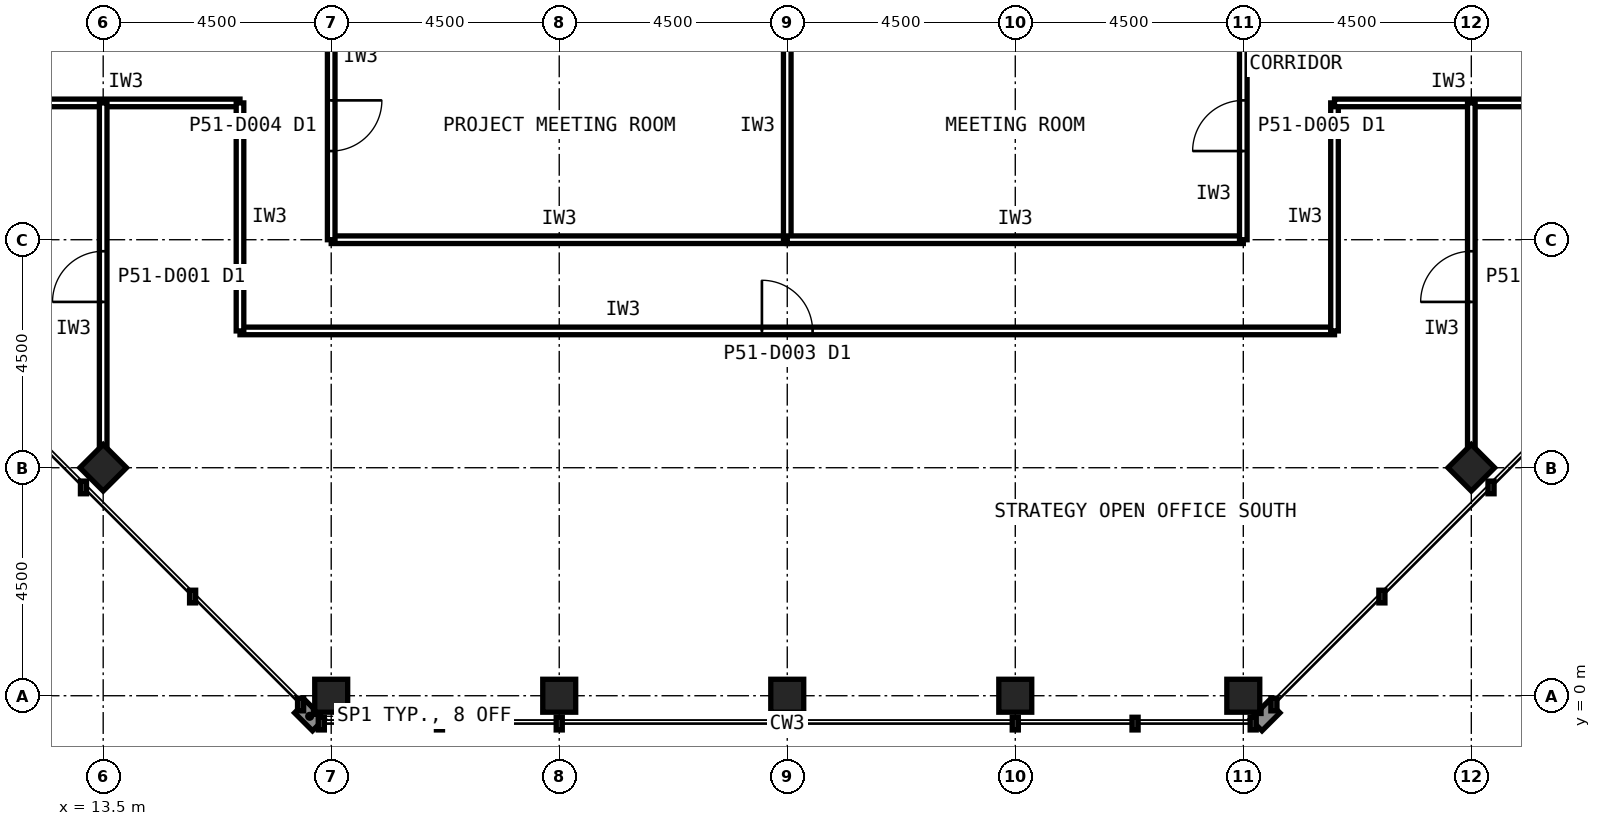
"""IFC4 building model, lengths in metres.
Left out: names, types, materials, properties, quantities, classifications, styles, units other than length and angle.
Written with IfcOpenShell. Run it as: python <this file> out.ifc"""

import sys

from ifc_helpers import new_model, si_unit, direction, frame, frame_2d, origin, origin_2d, place, context, subcontext, project, spatial, rectangle, hollow_rectangle, extrude, element, fill, save


model = new_model("IFC4")
c1 = context("Model", 3, precision=1e-05, world=origin(), true_north=direction((0.0, 1.0)))
c2 = subcontext(c1, "Body", "Model", "MODEL_VIEW")
j1 = project(units=[si_unit("LENGTHUNIT", "METRE"), si_unit("PLANEANGLEUNIT", "RADIAN")], contexts=[c1])
p1 = place(None, origin())
s1 = spatial("IfcSite", under=j1, at=p1, CompositionType="ELEMENT")
p2 = place(p1, origin())
s2 = spatial("IfcBuilding", under=s1, at=p2, CompositionType="ELEMENT")
p3 = place(p2, frame((0.0, 0.0, 214.6)))
s3 = spatial("IfcBuildingStorey", under=s2, at=p3, CompositionType="ELEMENT", Elevation=214.6)
for number, where, z_axis, x_axis in (
    (1, (18.0, 0.0, 0.0), (0.0, 0.0, 1.0), (1.0, 0.0, 0.0)),
    (2, (22.5, 0.0, 0.0), (0.0, 0.0, 1.0), (1.0, 0.0, 0.0)),
    (3, (27.0, 0.0, 0.0), (0.0, 0.0, 1.0), (1.0, 0.0, 0.0)),
    (4, (31.5, 0.0, 0.0), (0.0, 0.0, 1.0), (1.0, 0.0, 0.0)),
    (5, (36.0, 0.0, 0.0), (0.0, 0.0, 1.0), (1.0, 0.0, 0.0)),
    (6, (13.5, 4.5, 0.0), (0.0, 0.0, 1.0), (0.707, 0.707, 0.0)),
    (7, (40.5, 4.5, 0.0), (0.0, 0.0, 1.0), (0.707, 0.707, 0.0)),
):
    element("IfcColumn", number, at=place(p3, frame(where, z_axis=z_axis, x_axis=x_axis)), inside=s3, PredefinedType="COLUMN", context=c2, shape_type="SweptSolid", body=[
        extrude(hollow_rectangle(XDim=0.65, YDim=0.65, WallThickness=0.032, at=origin_2d()), origin(), (0.0, 0.0, 1.0), 4.0),
    ])
p4 = place(p3, frame((16.2, 7.2, 0.0), z_axis=(0.0, 0.0, 1.0), x_axis=(1.0, 0.0, 0.0)))
e8 = element("IfcWall", 8, at=p4, inside=s3, PredefinedType="PARTITIONING", context=c2, shape_type="SweptSolid", body=[
    extrude(rectangle(XDim=21.6, YDim=0.15, at=frame_2d((10.8, 0.0))), origin(), (0.0, 0.0, 1.0), 3.84),
])
p5 = place(p4, frame((10.3, 0.0, 0.0)))
e9 = element("IfcOpeningElement", 9, at=p5, cuts=e8, PredefinedType="OPENING", context=c2, shape_type="SweptSolid", body=[
    extrude(rectangle(XDim=1.0, YDim=2.1, at=frame_2d((0.5, 1.05))), frame((0.0, 0.085, 0.0), z_axis=(0.0, -1.0, 0.0), x_axis=(1.0, 0.0, 0.0)), (0.0, 0.0, 1.0), 0.17),
])
for number, where, z_axis, x_axis in (
    (10, (11.7, 11.7, 0.0), (0.0, 0.0, 1.0), (1.0, 0.0, 0.0)),
    (11, (16.2, 11.7, 0.0), (0.0, 0.0, 1.0), (0.0, -1.0, 0.0)),
    (12, (37.8, 7.2, 0.0), (0.0, 0.0, 1.0), (0.0, 1.0, 0.0)),
    (13, (37.8, 11.7, 0.0), (0.0, 0.0, 1.0), (1.0, 0.0, 0.0)),
):
    element("IfcWall", number, at=place(p3, frame(where, z_axis=z_axis, x_axis=x_axis)), inside=s3, PredefinedType="PARTITIONING", context=c2, shape_type="SweptSolid", body=[
        extrude(rectangle(XDim=4.5, YDim=0.15, at=frame_2d((2.25, 0.0))), origin(), (0.0, 0.0, 1.0), 3.84),
    ])
p6 = place(p3, frame((18.0, 9.0, 0.0), z_axis=(0.0, 0.0, 1.0), x_axis=(1.0, 0.0, 0.0)))
e14 = element("IfcWall", 14, at=p6, inside=s3, PredefinedType="PARTITIONING", context=c2, shape_type="SweptSolid", body=[
    extrude(rectangle(XDim=9.0, YDim=0.15, at=frame_2d((4.5, 0.0))), origin(), (0.0, 0.0, 1.0), 3.84),
])
p7 = place(p3, frame((27.0, 9.0, 0.0), z_axis=(0.0, 0.0, 1.0), x_axis=(0.0, 1.0, 0.0)))
e15 = element("IfcWall", 15, at=p7, inside=s3, PredefinedType="PARTITIONING", context=c2, shape_type="SweptSolid", body=[
    extrude(rectangle(XDim=4.5, YDim=0.15, at=frame_2d((2.25, 0.0))), origin(), (0.0, 0.0, 1.0), 2.989),
])
p8 = place(p3, frame((18.0, 13.5, 0.0), z_axis=(0.0, 0.0, 1.0), x_axis=(0.0, -1.0, 0.0)))
e16 = element("IfcWall", 16, at=p8, inside=s3, PredefinedType="PARTITIONING", context=c2, shape_type="SweptSolid", body=[
    extrude(rectangle(XDim=4.5, YDim=0.15, at=frame_2d((2.25, 0.0))), origin(), (0.0, 0.0, 1.0), 2.989),
])
p9 = place(p8, frame((1.75, 0.0, 0.0)))
e17 = element("IfcOpeningElement", 17, at=p9, cuts=e16, PredefinedType="OPENING", context=c2, shape_type="SweptSolid", body=[
    extrude(rectangle(XDim=1.0, YDim=2.1, at=frame_2d((0.5, 1.05))), frame((0.0, 0.085, 0.0), z_axis=(0.0, -1.0, 0.0), x_axis=(1.0, 0.0, 0.0)), (0.0, 0.0, 1.0), 0.17),
])
p10 = place(p3, frame((27.0, 9.0, 0.0), z_axis=(0.0, 0.0, 1.0), x_axis=(1.0, 0.0, 0.0)))
e18 = element("IfcWall", 18, at=p10, inside=s3, PredefinedType="PARTITIONING", context=c2, shape_type="SweptSolid", body=[
    extrude(rectangle(XDim=9.0, YDim=0.15, at=frame_2d((4.5, 0.0))), origin(), (0.0, 0.0, 1.0), 3.84),
])
p11 = place(p3, frame((36.0, 9.0, 0.0), z_axis=(0.0, 0.0, 1.0), x_axis=(0.0, 1.0, 0.0)))
e19 = element("IfcWall", 19, at=p11, inside=s3, PredefinedType="PARTITIONING", context=c2, shape_type="SweptSolid", body=[
    extrude(rectangle(XDim=4.5, YDim=0.15, at=frame_2d((2.25, 0.0))), origin(), (0.0, 0.0, 1.0), 2.989),
])
p12 = place(p11, frame((1.75, 0.0, 0.0)))
e20 = element("IfcOpeningElement", 20, at=p12, cuts=e19, PredefinedType="OPENING", context=c2, shape_type="SweptSolid", body=[
    extrude(rectangle(XDim=1.0, YDim=2.1, at=frame_2d((0.5, 1.05))), frame((0.0, 0.085, 0.0), z_axis=(0.0, -1.0, 0.0), x_axis=(1.0, 0.0, 0.0)), (0.0, 0.0, 1.0), 0.17),
])
p13 = place(p3, frame((40.5, 4.845, 0.0), z_axis=(0.0, 0.0, 1.0), x_axis=(0.0, 1.0, 0.0)))
e21 = element("IfcWall", 21, at=p13, inside=s3, PredefinedType="PARTITIONING", context=c2, shape_type="SweptSolid", body=[
    extrude(rectangle(XDim=6.855, YDim=0.15, at=frame_2d((3.427, 0.0))), origin(), (0.0, 0.0, 1.0), 2.989),
])
p14 = place(p13, frame((2.927, 0.0, 0.0)))
e22 = element("IfcOpeningElement", 22, at=p14, cuts=e21, PredefinedType="OPENING", context=c2, shape_type="SweptSolid", body=[
    extrude(rectangle(XDim=1.0, YDim=2.1, at=frame_2d((0.5, 1.05))), frame((0.0, 0.085, 0.0), z_axis=(0.0, -1.0, 0.0), x_axis=(1.0, 0.0, 0.0)), (0.0, 0.0, 1.0), 0.17),
])
p15 = place(p3, frame((13.5, 4.845, 0.0), z_axis=(0.0, 0.0, 1.0), x_axis=(0.0, 1.0, 0.0)))
e23 = element("IfcWall", 23, at=p15, inside=s3, PredefinedType="PARTITIONING", context=c2, shape_type="SweptSolid", body=[
    extrude(rectangle(XDim=6.855, YDim=0.15, at=frame_2d((3.427, 0.0))), origin(), (0.0, 0.0, 1.0), 2.989),
])
p16 = place(p15, frame((2.927, 0.0, 0.0)))
e24 = element("IfcOpeningElement", 24, at=p16, cuts=e23, PredefinedType="OPENING", context=c2, shape_type="SweptSolid", body=[
    extrude(rectangle(XDim=1.0, YDim=2.1, at=frame_2d((0.5, 1.05))), frame((0.0, 0.085, 0.0), z_axis=(0.0, -1.0, 0.0), x_axis=(1.0, 0.0, 0.0)), (0.0, 0.0, 1.0), 0.17),
])
p17 = place(p5, origin())
e25 = element("IfcDoor", 25, at=p17, inside=s3, OperationType="SINGLE_SWING_LEFT", PredefinedType="DOOR", context=c2, shape_type="SweptSolid", body=[
    extrude(rectangle(XDim=1.0, YDim=2.1, at=frame_2d((0.5, 1.05))), frame((0.0, 0.025, 0.0), z_axis=(0.0, -1.0, 0.0), x_axis=(1.0, 0.0, 0.0)), (0.0, 0.0, 1.0), 0.05),
])
fill(e9, e25)
p18 = place(p9, origin())
e26 = element("IfcDoor", 26, at=p18, inside=s3, OperationType="SINGLE_SWING_LEFT", PredefinedType="DOOR", context=c2, shape_type="SweptSolid", body=[
    extrude(rectangle(XDim=1.0, YDim=2.1, at=frame_2d((0.5, 1.05))), frame((0.0, 0.025, 0.0), z_axis=(0.0, -1.0, 0.0), x_axis=(1.0, 0.0, 0.0)), (0.0, 0.0, 1.0), 0.05),
])
fill(e17, e26)
p19 = place(p12, origin())
e27 = element("IfcDoor", 27, at=p19, inside=s3, OperationType="SINGLE_SWING_LEFT", PredefinedType="DOOR", context=c2, shape_type="SweptSolid", body=[
    extrude(rectangle(XDim=1.0, YDim=2.1, at=frame_2d((0.5, 1.05))), frame((0.0, 0.025, 0.0), z_axis=(0.0, -1.0, 0.0), x_axis=(1.0, 0.0, 0.0)), (0.0, 0.0, 1.0), 0.05),
])
fill(e20, e27)
p20 = place(p14, origin())
e28 = element("IfcDoor", 28, at=p20, inside=s3, OperationType="SINGLE_SWING_LEFT", PredefinedType="DOOR", context=c2, shape_type="SweptSolid", body=[
    extrude(rectangle(XDim=1.0, YDim=2.1, at=frame_2d((0.5, 1.05))), frame((0.0, 0.025, 0.0), z_axis=(0.0, -1.0, 0.0), x_axis=(1.0, 0.0, 0.0)), (0.0, 0.0, 1.0), 0.05),
])
fill(e22, e28)
p21 = place(p16, origin())
e29 = element("IfcDoor", 29, at=p21, inside=s3, OperationType="SINGLE_SWING_LEFT", PredefinedType="DOOR", context=c2, shape_type="SweptSolid", body=[
    extrude(rectangle(XDim=1.0, YDim=2.1, at=frame_2d((0.5, 1.05))), frame((0.0, 0.025, 0.0), z_axis=(0.0, -1.0, 0.0), x_axis=(1.0, 0.0, 0.0)), (0.0, 0.0, 1.0), 0.05),
])
fill(e24, e29)
save(model, sys.argv[1])
